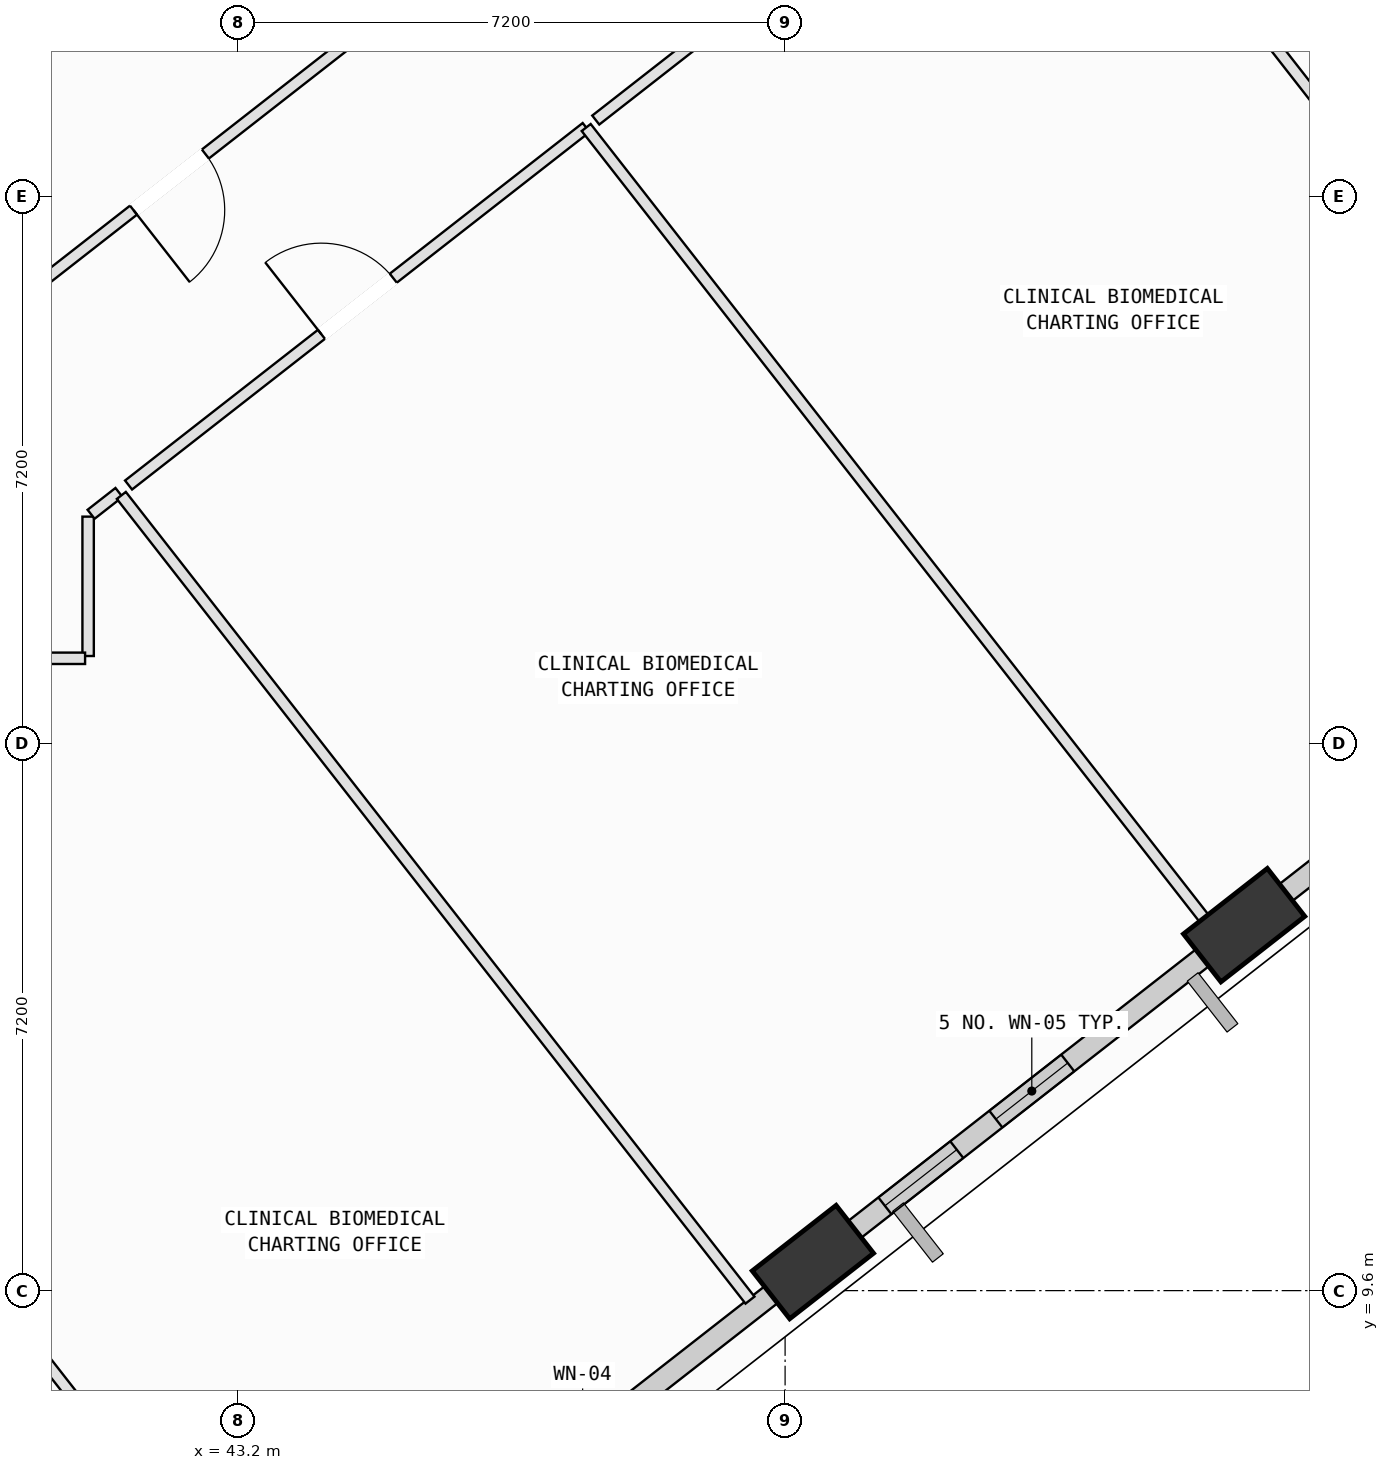
"""IFC4 building model, lengths in metres.
Left out: names, types, materials, properties, quantities, classifications, styles, units other than length and angle.
Written with IfcOpenShell. Run it as: python <this file> out.ifc"""

import sys

from ifc_helpers import new_model, si_unit, direction, frame, frame_2d, origin, origin_2d, place, context, subcontext, project, spatial, rectangle, extrude, element, fill, save


model = new_model("IFC4")
c1 = context("Model", 3, precision=1e-05, world=origin(), true_north=direction((0.0, 1.0)))
c2 = subcontext(c1, "Body", "Model", "MODEL_VIEW")
j1 = project(units=[si_unit("LENGTHUNIT", "METRE"), si_unit("PLANEANGLEUNIT", "RADIAN")], contexts=[c1])
p1 = place(None, origin())
s1 = spatial("IfcSite", under=j1, at=p1, CompositionType="ELEMENT")
p2 = place(p1, origin())
s2 = spatial("IfcBuilding", under=s1, at=p2, CompositionType="ELEMENT")
p3 = place(p2, frame((0.0, 0.0, 185.8)))
s3 = spatial("IfcBuildingStorey", under=s2, at=p3, CompositionType="ELEMENT", Elevation=185.8)
p4 = place(p3, frame((50.766, 9.976, 0.002), z_axis=(0.060579626356, 0.071345282847, 0.995610345208), x_axis=(-0.997420646778, 0.042797849561, 0.057622890015)))
e1 = element("IfcColumn", 1, at=p4, inside=s3, PredefinedType="COLUMN", context=c2, shape_type="SweptSolid", body=[
    extrude(rectangle(XDim=1.4, YDim=0.8, at=origin_2d()), origin(), (0.0, 0.0, 1.0), 4.014),
])
p5 = place(p3, frame((56.439, 14.409, 0.002), z_axis=(0.042048339498, 0.094487236879, 0.994637672327), x_axis=(-0.968910525672, -0.239077872553, 0.063672318137)))
e2 = element("IfcColumn", 2, at=p5, inside=s3, PredefinedType="COLUMN", context=c2, shape_type="SweptSolid", body=[
    extrude(rectangle(XDim=1.4, YDim=0.8, at=origin_2d()), origin(), (0.0, 0.0, 1.0), 4.018),
])
p6 = place(p3, frame((50.521, 9.784, 0.0), z_axis=(0.0, 0.0, 1.0), x_axis=(-0.788024969853, -0.615643278927, 0.0)))
e3 = element("IfcWall", 3, at=p6, inside=s3, PredefinedType="SOLIDWALL", context=c2, shape_type="SweptSolid", body=[
    extrude(rectangle(XDim=6.209, YDim=0.28, at=frame_2d((3.104, 0.0))), origin(), (0.0, 0.0, 1.0), 3.265),
])
p7 = place(p6, frame((2.634, 0.0, 0.75)))
e4 = element("IfcOpeningElement", 4, at=p7, cuts=e3, PredefinedType="OPENING", context=c2, shape_type="SweptSolid", body=[
    extrude(rectangle(XDim=1.8, YDim=2.05, at=frame_2d((0.9, 1.025))), frame((0.0, 0.15, 0.0), z_axis=(0.0, -1.0, 0.0), x_axis=(1.0, 0.0, 0.0)), (0.0, 0.0, 1.0), 0.3),
])
p8 = place(p3, frame((56.201, 14.222, 0.0), z_axis=(0.0, 0.0, 1.0), x_axis=(-0.788018421065, -0.6156516613, 0.0)))
e5 = element("IfcWall", 5, at=p8, inside=s3, PredefinedType="SOLIDWALL", context=c2, shape_type="SweptSolid", body=[
    extrude(rectangle(XDim=6.218, YDim=0.28, at=frame_2d((3.109, 0.0))), origin(), (0.0, 0.0, 1.0), 3.265),
])
p9 = place(p8, frame((2.642, 0.0, 0.75)))
e6 = element("IfcOpeningElement", 6, at=p9, cuts=e5, PredefinedType="OPENING", context=c2, shape_type="SweptSolid", body=[
    extrude(rectangle(XDim=1.2, YDim=1.75, at=frame_2d((0.6, 0.875))), frame((0.0, 0.15, 0.0), z_axis=(0.0, -1.0, 0.0), x_axis=(1.0, 0.0, 0.0)), (0.0, 0.0, 1.0), 0.3),
])
p10 = place(p8, frame((4.495, 0.0, 0.75)))
e7 = element("IfcOpeningElement", 7, at=p10, cuts=e5, PredefinedType="OPENING", context=c2, shape_type="SweptSolid", body=[
    extrude(rectangle(XDim=1.2, YDim=1.75, at=frame_2d((0.6, 0.875))), frame((0.0, 0.15, 0.0), z_axis=(0.0, -1.0, 0.0), x_axis=(1.0, 0.0, 0.0)), (0.0, 0.0, 1.0), 0.3),
])
p11 = place(p3, frame((61.887, 18.664, 0.0), z_axis=(0.0, 0.0, 1.0), x_axis=(-0.78801310803, -0.61565846179, 0.0)))
e8 = element("IfcWall", 8, at=p11, inside=s3, PredefinedType="SOLIDWALL", context=c2, shape_type="SweptSolid", body=[
    extrude(rectangle(XDim=6.242, YDim=0.28, at=frame_2d((3.121, 0.0))), origin(), (0.0, 0.0, 1.0), 3.265),
])
p12 = place(p11, frame((0.868, 0.0, 0.75)))
e9 = element("IfcOpeningElement", 9, at=p12, cuts=e8, PredefinedType="OPENING", context=c2, shape_type="SweptSolid", body=[
    extrude(rectangle(XDim=1.6, YDim=1.95, at=frame_2d((0.8, 0.975))), frame((0.0, 0.15, 0.0), z_axis=(0.0, -1.0, 0.0), x_axis=(1.0, 0.0, 0.0)), (0.0, 0.0, 1.0), 0.3),
])
p13 = place(p3, frame((36.15, 14.454, 0.0), z_axis=(0.0, 0.0, 1.0), x_axis=(0.615678011818, -0.787997833604, 0.0)))
e10 = element("IfcWall", 10, at=p13, inside=s3, PredefinedType="PARTITIONING", context=c2, shape_type="SweptSolid", body=[
    extrude(rectangle(XDim=12.413, YDim=0.15, at=frame_2d((6.206, 0.0))), origin(), (0.0, 0.0, 1.0), 3.78),
])
p14 = place(p13, frame((5.776, 0.0, 0.0)))
e11 = element("IfcOpeningElement", 11, at=p14, cuts=e10, PredefinedType="OPENING", context=c2, shape_type="SweptSolid", body=[
    extrude(rectangle(XDim=0.86, YDim=2.06, at=frame_2d((0.43, 1.03))), frame((0.0, 0.085, 0.0), z_axis=(0.0, -1.0, 0.0), x_axis=(1.0, 0.0, 0.0)), (0.0, 0.0, 1.0), 0.17),
])
p15 = place(p3, frame((41.23, 17.95, 0.0), z_axis=(0.0, 0.0, 1.0), x_axis=(0.0, 1.0, 0.0)))
e12 = element("IfcWall", 12, at=p15, inside=s3, PredefinedType="PARTITIONING", context=c2, shape_type="SweptSolid", body=[
    extrude(rectangle(XDim=1.834, YDim=0.15, at=frame_2d((0.917, 0.0))), origin(), (0.0, 0.0, 1.0), 3.78),
])
p16 = place(p3, frame((41.269, 19.815, 0.0), z_axis=(0.0, 0.0, 1.0), x_axis=(0.787571341055, 0.616223484418, 0.0)))
e13 = element("IfcWall", 13, at=p16, inside=s3, PredefinedType="PARTITIONING", context=c2, shape_type="SweptSolid", body=[
    extrude(rectangle(XDim=0.466, YDim=0.15, at=frame_2d((0.233, 0.0))), origin(), (0.0, 0.0, 1.0), 3.065),
])
p17 = place(p3, frame((41.667, 20.063, 0.0), z_axis=(0.0, 0.0, 1.0), x_axis=(0.615607368114, -0.788053023802, 0.0)))
e14 = element("IfcWall", 14, at=p17, inside=s3, PredefinedType="PARTITIONING", context=c2, shape_type="SweptSolid", body=[
    extrude(rectangle(XDim=13.436, YDim=0.15, at=frame_2d((6.718, 0.0))), origin(), (0.0, 0.0, 1.0), 3.78),
])
p18 = place(p3, frame((38.894, 17.92, 0.0), z_axis=(0.0, 0.0, 1.0), x_axis=(1.0, 0.0, 0.0)))
e15 = element("IfcWall", 15, at=p18, inside=s3, PredefinedType="PARTITIONING", context=c2, shape_type="SweptSolid", body=[
    extrude(rectangle(XDim=2.296, YDim=0.15, at=frame_2d((1.148, 0.0))), origin(), (0.0, 0.0, 1.0), 3.78),
])
p19 = place(p3, frame((41.762, 20.2, 0.0), z_axis=(0.0, 0.0, 1.0), x_axis=(0.78801177859, 0.615660163404, 0.0)))
e16 = element("IfcWall", 16, at=p19, inside=s3, PredefinedType="PARTITIONING", context=c2, shape_type="SweptSolid", body=[
    extrude(rectangle(XDim=7.641, YDim=0.15, at=frame_2d((3.82, 0.0))), origin(), (0.0, 0.0, 1.0), 3.065),
])
p20 = place(p19, frame((3.22, 0.0, 0.0)))
e17 = element("IfcOpeningElement", 17, at=p20, cuts=e16, PredefinedType="OPENING", context=c2, shape_type="SweptSolid", body=[
    extrude(rectangle(XDim=1.2, YDim=2.15, at=frame_2d((0.6, 1.075))), frame((0.0, 0.085, 0.0), z_axis=(0.0, -1.0, 0.0), x_axis=(1.0, 0.0, 0.0)), (0.0, 0.0, 1.0), 0.17),
])
p21 = place(p3, frame((47.783, 24.904, 0.0), z_axis=(0.0, 0.0, 1.0), x_axis=(0.615629988963, -0.788035352436, 0.0)))
e18 = element("IfcWall", 18, at=p21, inside=s3, PredefinedType="PARTITIONING", context=c2, shape_type="SweptSolid", body=[
    extrude(rectangle(XDim=13.485, YDim=0.15, at=frame_2d((6.743, 0.0))), origin(), (0.0, 0.0, 1.0), 3.78),
])
p22 = place(p3, frame((51.442, 10.213, 0.0), z_axis=(0.0, 0.0, 1.0), x_axis=(-0.787702718668, -0.616055538895, 0.0)))
e19 = element("IfcWall", 19, at=p22, inside=s3, PredefinedType="PARTITIONING", context=c2, shape_type="SweptSolid", body=[
    extrude(rectangle(XDim=0.99, YDim=0.15, at=frame_2d((0.495, 0.0))), origin(), (0.0, 0.0, 1.0), 3.265),
])
p23 = place(p3, frame((47.909, 25.002, 0.0), z_axis=(0.0, 0.0, 1.0), x_axis=(0.787963326544, 0.615722174379, 0.0)))
e20 = element("IfcWall", 20, at=p23, inside=s3, PredefinedType="PARTITIONING", context=c2, shape_type="SweptSolid", body=[
    extrude(rectangle(XDim=7.64, YDim=0.15, at=frame_2d((3.82, 0.0))), origin(), (0.0, 0.0, 1.0), 3.78),
])
p24 = place(p23, frame((3.22, 0.0, 0.0)))
e21 = element("IfcOpeningElement", 21, at=p24, cuts=e20, PredefinedType="OPENING", context=c2, shape_type="SweptSolid", body=[
    extrude(rectangle(XDim=1.2, YDim=2.15, at=frame_2d((0.6, 1.075))), frame((0.0, 0.085, 0.0), z_axis=(0.0, -1.0, 0.0), x_axis=(1.0, 0.0, 0.0)), (0.0, 0.0, 1.0), 0.17),
])
p25 = place(p3, frame((53.929, 29.706, 0.0), z_axis=(0.0, 0.0, 1.0), x_axis=(0.61569405519, -0.787985298342, 0.0)))
e22 = element("IfcWall", 22, at=p25, inside=s3, PredefinedType="PARTITIONING", context=c2, shape_type="SweptSolid", body=[
    extrude(rectangle(XDim=13.83, YDim=0.15, at=frame_2d((6.915, 0.0))), origin(), (0.0, 0.0, 1.0), 3.78),
])
p26 = place(p3, frame((57.109, 14.64, 0.0), z_axis=(0.0, 0.0, 1.0), x_axis=(-0.787960577914, -0.61572569189, 0.0)))
e23 = element("IfcWall", 23, at=p26, inside=s3, PredefinedType="PARTITIONING", context=c2, shape_type="SweptSolid", body=[
    extrude(rectangle(XDim=0.87, YDim=0.15, at=frame_2d((0.435, 0.0))), origin(), (0.0, 0.0, 1.0), 3.265),
])
p27 = place(p3, frame((46.566, 27.519, 0.0), z_axis=(0.0, 0.0, 1.0), x_axis=(-0.788006255186, -0.615667232998, 0.0)))
e24 = element("IfcWall", 24, at=p27, inside=s3, PredefinedType="PARTITIONING", context=c2, shape_type="SweptSolid", body=[
    extrude(rectangle(XDim=10.827, YDim=0.15, at=frame_2d((5.414, 0.0))), origin(), (0.0, 0.0, 1.0), 3.065),
])
p28 = place(p27, frame((4.814, 0.0, 0.0)))
e25 = element("IfcOpeningElement", 25, at=p28, cuts=e24, PredefinedType="OPENING", context=c2, shape_type="SweptSolid", body=[
    extrude(rectangle(XDim=1.2, YDim=2.15, at=frame_2d((0.6, 1.075))), frame((0.0, 0.085, 0.0), z_axis=(0.0, -1.0, 0.0), x_axis=(1.0, 0.0, 0.0)), (0.0, 0.0, 1.0), 0.17),
])
p29 = place(p3, frame((34.931, 24.825, 0.0), z_axis=(0.0, 0.0, 1.0), x_axis=(0.788048984309, 0.615612539127, 0.0)))
e26 = element("IfcWall", 26, at=p29, inside=s3, PredefinedType="PARTITIONING", context=c2, shape_type="SweptSolid", body=[
    extrude(rectangle(XDim=10.828, YDim=0.15, at=frame_2d((5.414, 0.0))), origin(), (0.0, 0.0, 1.0), 3.265),
])
p30 = place(p3, frame((55.21, 30.795, 0.0), z_axis=(0.0, 0.0, 1.0), x_axis=(0.615684921199, -0.787992435122, 0.0)))
e27 = element("IfcWall", 27, at=p30, inside=s3, PredefinedType="PARTITIONING", context=c2, shape_type="SweptSolid", body=[
    extrude(rectangle(XDim=11.821, YDim=0.15, at=frame_2d((5.911, 0.0))), origin(), (0.0, 0.0, 1.0), 3.78),
])
p31 = place(p30, frame((5.481, 0.0, 0.0)))
e28 = element("IfcOpeningElement", 28, at=p31, cuts=e27, PredefinedType="OPENING", context=c2, shape_type="SweptSolid", body=[
    extrude(rectangle(XDim=0.86, YDim=2.06, at=frame_2d((0.43, 1.03))), frame((0.0, 0.085, 0.0), z_axis=(0.0, -1.0, 0.0), x_axis=(1.0, 0.0, 0.0)), (0.0, 0.0, 1.0), 0.17),
])
p32 = place(p3, frame((57.164, 32.322, 0.0), z_axis=(0.0, 0.0, 1.0), x_axis=(0.615692601108, -0.787986434491, 0.0)))
e29 = element("IfcWall", 29, at=p32, inside=s3, PredefinedType="PARTITIONING", context=c2, shape_type="SweptSolid", body=[
    extrude(rectangle(XDim=11.22, YDim=0.15, at=frame_2d((5.61, 0.0))), origin(), (0.0, 0.0, 1.0), 3.265),
])
p33 = place(p9, origin())
e30 = element("IfcWindow", 30, at=p33, inside=s3, PartitioningType="SINGLE_PANEL", PredefinedType="WINDOW", context=c2, shape_type="SweptSolid", body=[
    extrude(rectangle(XDim=1.2, YDim=1.75, at=frame_2d((0.6, 0.875))), frame((0.0, 0.03, 0.0), z_axis=(0.0, -1.0, 0.0), x_axis=(1.0, 0.0, 0.0)), (0.0, 0.0, 1.0), 0.06),
])
fill(e6, e30)
p34 = place(p10, origin())
e31 = element("IfcWindow", 31, at=p34, inside=s3, PartitioningType="SINGLE_PANEL", PredefinedType="WINDOW", context=c2, shape_type="SweptSolid", body=[
    extrude(rectangle(XDim=1.2, YDim=1.75, at=frame_2d((0.6, 0.875))), frame((0.0, 0.03, 0.0), z_axis=(0.0, -1.0, 0.0), x_axis=(1.0, 0.0, 0.0)), (0.0, 0.0, 1.0), 0.06),
])
fill(e7, e31)
p35 = place(p20, origin())
e32 = element("IfcDoor", 32, at=p35, inside=s3, OperationType="SINGLE_SWING_LEFT", PredefinedType="DOOR", context=c2, shape_type="SweptSolid", body=[
    extrude(rectangle(XDim=1.2, YDim=2.15, at=frame_2d((0.6, 1.075))), frame((0.0, 0.025, 0.0), z_axis=(0.0, -1.0, 0.0), x_axis=(1.0, 0.0, 0.0)), (0.0, 0.0, 1.0), 0.05),
])
fill(e17, e32)
p36 = place(p28, origin())
e33 = element("IfcDoor", 33, at=p36, inside=s3, OperationType="SINGLE_SWING_RIGHT", PredefinedType="DOOR", context=c2, shape_type="SweptSolid", body=[
    extrude(rectangle(XDim=1.2, YDim=2.15, at=frame_2d((0.6, 1.075))), frame((0.0, 0.025, 0.0), z_axis=(0.0, -1.0, 0.0), x_axis=(1.0, 0.0, 0.0)), (0.0, 0.0, 1.0), 0.05),
])
fill(e25, e33)
save(model, sys.argv[1])
